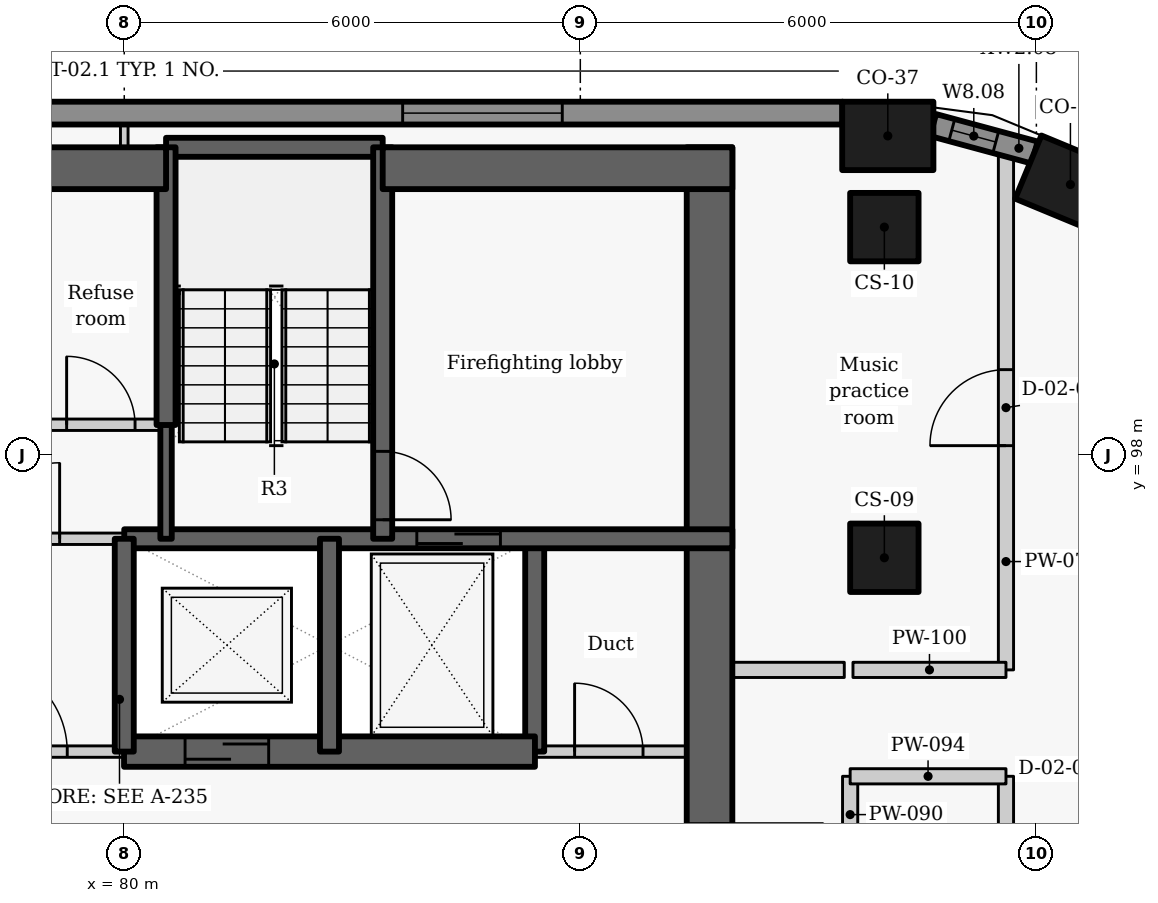
"""IFC4 building model, lengths in metres.
Left out: names, types, materials, properties, quantities, classifications, styles, units other than length and angle.
Written with IfcOpenShell. Run it as: python <this file> out.ifc"""

import sys

from ifc_helpers import new_model, si_unit, direction, frame, frame_2d, origin, origin_2d, place, context, subcontext, project, spatial, rectangle, extrude, element, fill, save


model = new_model("IFC4")
c1 = context("Model", 3, precision=1e-05, world=origin(), true_north=direction((0.0, 1.0)))
c2 = subcontext(c1, "Body", "Model", "MODEL_VIEW")
j1 = project(units=[si_unit("LENGTHUNIT", "METRE"), si_unit("PLANEANGLEUNIT", "RADIAN")], contexts=[c1])
p1 = place(None, origin())
s1 = spatial("IfcSite", under=j1, at=p1, CompositionType="ELEMENT")
p2 = place(p1, origin())
s2 = spatial("IfcBuilding", under=s1, at=p2, CompositionType="ELEMENT")
p3 = place(p2, frame((0.0, 0.0, 203.1)))
s3 = spatial("IfcBuildingStorey", under=s2, at=p3, CompositionType="ELEMENT", Elevation=203.1)
for number, where, z_axis, x_axis in (
    (1, (92.448, 101.56, 0.0), (0.0, 0.0, 1.0), (-0.924, 0.383, 0.0)),
    (2, (90.045, 102.2, 0.0), (0.0, 0.0, 1.0), (-1.0, 0.0, 0.0)),
):
    element("IfcColumn", number, at=place(p3, frame(where, z_axis=z_axis, x_axis=x_axis)), inside=s3, PredefinedType="COLUMN", context=c2, shape_type="SweptSolid", body=[
        extrude(rectangle(XDim=1.2, YDim=0.9, at=origin_2d()), origin(), (0.0, 0.0, 1.0), 3.3),
    ])
for number, where, z_axis, x_axis in (
    (3, (90.0, 96.65, 0.0), (0.0, 0.0, 1.0), (0.0, 1.0, 0.0)),
    (4, (90.0, 101.0, 0.0), (0.0, 0.0, 1.0), (0.0, 1.0, 0.0)),
):
    element("IfcColumn", number, at=place(p3, frame(where, z_axis=z_axis, x_axis=x_axis)), inside=s3, PredefinedType="COLUMN", context=c2, shape_type="SweptSolid", body=[
        extrude(rectangle(XDim=0.9, YDim=0.9, at=origin_2d()), origin(), (0.0, 0.0, 1.0), 3.3),
    ])
p4 = place(p3, frame((91.977, 101.981, 0.0), z_axis=(0.0, 0.0, 1.0), x_axis=(-0.965315341278, 0.261086751661, 0.0)))
e5 = element("IfcWall", 5, at=p4, inside=s3, PredefinedType="SOLIDWALL", context=c2, shape_type="SweptSolid", body=[
    extrude(rectangle(XDim=1.384, YDim=0.3, at=frame_2d((0.692, 0.0))), origin(), (0.0, 0.0, 1.0), 2.425),
])
p5 = place(p4, frame((0.529, 0.0, 0.9)))
e6 = element("IfcOpeningElement", 6, at=p5, cuts=e5, PredefinedType="OPENING", context=c2, shape_type="SweptSolid", body=[
    extrude(rectangle(XDim=0.6, YDim=1.1, at=frame_2d((0.3, 0.55))), frame((0.0, 0.16, 0.0), z_axis=(0.0, -1.0, 0.0), x_axis=(1.0, 0.0, 0.0)), (0.0, 0.0, 1.0), 0.32),
])
p6 = place(p3, frame((89.449, 102.5, 0.0), z_axis=(0.0, 0.0, 1.0), x_axis=(-1.0, 0.0, 0.0)))
e7 = element("IfcWall", 7, at=p6, inside=s3, PredefinedType="SOLIDWALL", context=c2, shape_type="SweptSolid", body=[
    extrude(rectangle(XDim=18.933, YDim=0.3, at=frame_2d((9.466, 0.0))), origin(), (0.0, 0.0, 1.0), 2.425),
])
p7 = place(p6, frame((3.687, 0.0, 0.9)))
e8 = element("IfcOpeningElement", 8, at=p7, cuts=e7, PredefinedType="OPENING", context=c2, shape_type="SweptSolid", body=[
    extrude(rectangle(XDim=2.1, YDim=1.1, at=frame_2d((1.05, 0.55))), frame((0.0, 0.16, 0.0), z_axis=(0.0, -1.0, 0.0), x_axis=(1.0, 0.0, 0.0)), (0.0, 0.0, 1.0), 0.32),
])
p8 = place(p6, frame((13.118, 0.0, 0.9)))
e9 = element("IfcOpeningElement", 9, at=p8, cuts=e7, PredefinedType="OPENING", context=c2, shape_type="SweptSolid", body=[
    extrude(rectangle(XDim=2.1, YDim=1.1, at=frame_2d((1.05, 0.55))), frame((0.0, 0.16, 0.0), z_axis=(0.0, -1.0, 0.0), x_axis=(1.0, 0.0, 0.0)), (0.0, 0.0, 1.0), 0.32),
])
p9 = place(p3, frame((85.4, 94.1, -0.275), z_axis=(0.0, 0.0, 1.0), x_axis=(0.0, 1.0, 0.0)))
e10 = element("IfcWall", 10, at=p9, inside=s3, PredefinedType="SHEAR", context=c2, shape_type="SweptSolid", body=[
    extrude(rectangle(XDim=2.8, YDim=0.25, at=frame_2d((1.4, 0.0))), origin(), (0.0, 0.0, 1.0), 3.3),
])
p10 = place(p3, frame((87.7, 102.05, -0.275), z_axis=(0.0, 0.0, 1.0), x_axis=(0.0, -1.0, 0.0)))
e11 = element("IfcWall", 11, at=p10, inside=s3, PredefinedType="SHEAR", context=c2, shape_type="SweptSolid", body=[
    extrude(rectangle(XDim=14.25, YDim=0.6, at=frame_2d((7.125, 0.0))), origin(), (0.0, 0.0, 1.0), 3.3),
])
p11 = place(p10, frame((8.898, 0.0, 0.275)))
e12 = element("IfcOpeningElement", 12, at=p11, cuts=e11, PredefinedType="OPENING", context=c2, shape_type="SweptSolid", body=[
    extrude(rectangle(XDim=1.5, YDim=2.1, at=frame_2d((0.75, 1.05))), frame((0.0, 0.31, 0.0), z_axis=(0.0, -1.0, 0.0), x_axis=(1.0, 0.0, 0.0)), (0.0, 0.0, 1.0), 0.62),
])
p12 = place(p3, frame((77.297, 94.1, 0.0), z_axis=(0.0, 0.0, 1.0), x_axis=(1.0, 0.0, 0.0)))
e13 = element("IfcWall", 13, at=p12, inside=s3, PredefinedType="PARTITIONING", context=c2, shape_type="SweptSolid", body=[
    extrude(rectangle(XDim=2.706, YDim=0.15, at=frame_2d((1.353, 0.0))), origin(), (0.0, 0.0, 1.0), 3.025),
])
p13 = place(p12, frame((0.753, 0.0, 0.0)))
e14 = element("IfcOpeningElement", 14, at=p13, cuts=e13, PredefinedType="OPENING", context=c2, shape_type="SweptSolid", body=[
    extrude(rectangle(XDim=1.2, YDim=2.1, at=frame_2d((0.6, 1.05))), frame((0.0, 0.085, 0.0), z_axis=(0.0, -1.0, 0.0), x_axis=(1.0, 0.0, 0.0)), (0.0, 0.0, 1.0), 0.17),
])
p14 = place(p3, frame((85.397, 94.1, 0.0), z_axis=(0.0, 0.0, 1.0), x_axis=(1.0, 0.0, 0.0)))
e15 = element("IfcWall", 15, at=p14, inside=s3, PredefinedType="PARTITIONING", context=c2, shape_type="SweptSolid", body=[
    extrude(rectangle(XDim=2.603, YDim=0.15, at=frame_2d((1.302, 0.0))), origin(), (0.0, 0.0, 1.0), 3.025),
])
p15 = place(p14, frame((0.528, 0.0, 0.0)))
e16 = element("IfcOpeningElement", 16, at=p15, cuts=e15, PredefinedType="OPENING", context=c2, shape_type="SweptSolid", body=[
    extrude(rectangle(XDim=0.9, YDim=2.1, at=frame_2d((0.45, 1.05))), frame((0.0, 0.085, 0.0), z_axis=(0.0, -1.0, 0.0), x_axis=(1.0, 0.0, 0.0)), (0.0, 0.0, 1.0), 0.17),
])
p16 = place(p3, frame((79.997, 94.1, -0.275), z_axis=(0.0, 0.0, 1.0), x_axis=(1.0, 0.0, 0.0)))
e17 = element("IfcWall", 17, at=p16, inside=s3, PredefinedType="SHEAR", context=c2, shape_type="SweptSolid", body=[
    extrude(rectangle(XDim=5.406, YDim=0.4, at=frame_2d((2.703, 0.0))), origin(), (0.0, 0.0, 1.0), 3.3),
])
p17 = place(p16, frame((0.803, 0.0, 0.275)))
e18 = element("IfcOpeningElement", 18, at=p17, cuts=e17, PredefinedType="OPENING", context=c2, shape_type="SweptSolid", body=[
    extrude(rectangle(XDim=1.1, YDim=2.1, at=frame_2d((0.55, 1.05))), frame((0.0, 0.21, 0.0), z_axis=(0.0, -1.0, 0.0), x_axis=(1.0, 0.0, 0.0)), (0.0, 0.0, 1.0), 0.42),
])
p18 = place(p3, frame((80.0, 96.9, -0.275), z_axis=(0.0, 0.0, 1.0), x_axis=(1.0, 0.0, 0.0)))
e19 = element("IfcWall", 19, at=p18, inside=s3, PredefinedType="SHEAR", context=c2, shape_type="SweptSolid", body=[
    extrude(rectangle(XDim=8.0, YDim=0.25, at=frame_2d((4.0, 0.0))), origin(), (0.0, 0.0, 1.0), 3.3),
])
p19 = place(p18, frame((3.849, 0.0, 0.275)))
e20 = element("IfcOpeningElement", 20, at=p19, cuts=e19, PredefinedType="OPENING", context=c2, shape_type="SweptSolid", body=[
    extrude(rectangle(XDim=1.1, YDim=2.1, at=frame_2d((0.55, 1.05))), frame((0.0, 0.135, 0.0), z_axis=(0.0, -1.0, 0.0), x_axis=(1.0, 0.0, 0.0)), (0.0, 0.0, 1.0), 0.27),
])
p20 = place(p3, frame((80.0, 94.1, -0.275), z_axis=(0.0, 0.0, 1.0), x_axis=(0.0, 1.0, 0.0)))
e21 = element("IfcWall", 21, at=p20, inside=s3, PredefinedType="SHEAR", context=c2, shape_type="SweptSolid", body=[
    extrude(rectangle(XDim=2.8, YDim=0.25, at=frame_2d((1.4, 0.0))), origin(), (0.0, 0.0, 1.0), 3.3),
])
p21 = place(p3, frame((77.3, 96.9, 0.0), z_axis=(0.0, 0.0, 1.0), x_axis=(1.0, 0.0, 0.0)))
e22 = element("IfcWall", 22, at=p21, inside=s3, PredefinedType="PARTITIONING", context=c2, shape_type="SweptSolid", body=[
    extrude(rectangle(XDim=2.7, YDim=0.15, at=frame_2d((1.35, 0.0))), origin(), (0.0, 0.0, 1.0), 3.025),
])
p22 = place(p21, frame((0.85, 0.0, 0.0)))
e23 = element("IfcOpeningElement", 23, at=p22, cuts=e22, PredefinedType="OPENING", context=c2, shape_type="SweptSolid", body=[
    extrude(rectangle(XDim=1.0, YDim=2.1, at=frame_2d((0.5, 1.05))), frame((0.0, 0.085, 0.0), z_axis=(0.0, -1.0, 0.0), x_axis=(1.0, 0.0, 0.0)), (0.0, 0.0, 1.0), 0.17),
])
p23 = place(p3, frame((82.7, 94.1, -0.275), z_axis=(0.0, 0.0, 1.0), x_axis=(0.0, 1.0, 0.0)))
e24 = element("IfcWall", 24, at=p23, inside=s3, PredefinedType="SHEAR", context=c2, shape_type="SweptSolid", body=[
    extrude(rectangle(XDim=2.8, YDim=0.25, at=frame_2d((1.4, 0.0))), origin(), (0.0, 0.0, 1.0), 3.3),
])
p24 = place(p3, frame((80.55, 102.05, -0.275), z_axis=(0.0, 0.0, 1.0), x_axis=(1.0, 0.0, 0.0)))
e25 = element("IfcWall", 25, at=p24, inside=s3, PredefinedType="SHEAR", context=c2, shape_type="SweptSolid", body=[
    extrude(rectangle(XDim=2.85, YDim=0.25, at=frame_2d((1.425, 0.0))), origin(), (0.0, 0.0, 1.0), 3.3),
])
p25 = place(p3, frame((83.4, 102.05, -0.275), z_axis=(0.0, 0.0, 1.0), x_axis=(0.0, -1.0, 0.0)))
e26 = element("IfcWall", 26, at=p25, inside=s3, PredefinedType="SHEAR", context=c2, shape_type="SweptSolid", body=[
    extrude(rectangle(XDim=5.15, YDim=0.25, at=frame_2d((2.575, 0.0))), origin(), (0.0, 0.0, 1.0), 3.3),
])
p26 = place(p25, frame((4.0, 0.0, 0.275)))
e27 = element("IfcOpeningElement", 27, at=p26, cuts=e26, PredefinedType="OPENING", context=c2, shape_type="SweptSolid", body=[
    extrude(rectangle(XDim=0.9, YDim=2.1, at=frame_2d((0.45, 1.05))), frame((0.0, 0.135, 0.0), z_axis=(0.0, -1.0, 0.0), x_axis=(1.0, 0.0, 0.0)), (0.0, 0.0, 1.0), 0.27),
])
p27 = place(p3, frame((80.55, 96.9, -0.275), z_axis=(0.0, 0.0, 1.0), x_axis=(0.0, 1.0, 0.0)))
e28 = element("IfcWall", 28, at=p27, inside=s3, PredefinedType="SHEAR", context=c2, shape_type="SweptSolid", body=[
    extrude(rectangle(XDim=1.503, YDim=0.15, at=frame_2d((0.751, 0.0))), origin(), (0.0, 0.0, 1.0), 3.3),
])
p28 = place(p3, frame((80.55, 98.397, -0.275), z_axis=(0.0, 0.0, 1.0), x_axis=(0.0, 1.0, 0.0)))
e29 = element("IfcWall", 29, at=p28, inside=s3, PredefinedType="SHEAR", context=c2, shape_type="SweptSolid", body=[
    extrude(rectangle(XDim=3.653, YDim=0.25, at=frame_2d((1.827, 0.0))), origin(), (0.0, 0.0, 1.0), 3.3),
])
p29 = place(p3, frame((75.35, 101.775, -0.275), z_axis=(0.0, 0.0, 1.0), x_axis=(1.0, 0.0, 0.0)))
e30 = element("IfcWall", 30, at=p29, inside=s3, PredefinedType="SHEAR", context=c2, shape_type="SweptSolid", body=[
    extrude(rectangle(XDim=5.2, YDim=0.55, at=frame_2d((2.6, 0.0))), origin(), (0.0, 0.0, 1.0), 3.3),
])
p30 = place(p3, frame((83.4, 101.775, -0.275), z_axis=(0.0, 0.0, 1.0), x_axis=(1.0, 0.0, 0.0)))
e31 = element("IfcWall", 31, at=p30, inside=s3, PredefinedType="SHEAR", context=c2, shape_type="SweptSolid", body=[
    extrude(rectangle(XDim=4.6, YDim=0.55, at=frame_2d((2.3, 0.0))), origin(), (0.0, 0.0, 1.0), 3.3),
])
p31 = place(p3, frame((75.35, 98.4, 0.0), z_axis=(0.0, 0.0, 1.0), x_axis=(1.0, 0.0, 0.0)))
e32 = element("IfcWall", 32, at=p31, inside=s3, PredefinedType="PARTITIONING", context=c2, shape_type="SweptSolid", body=[
    extrude(rectangle(XDim=5.2, YDim=0.15, at=frame_2d((2.6, 0.0))), origin(), (0.0, 0.0, 1.0), 3.025),
])
p32 = place(p31, frame((0.434, 0.0, 0.0)))
e33 = element("IfcOpeningElement", 33, at=p32, cuts=e32, PredefinedType="OPENING", context=c2, shape_type="SweptSolid", body=[
    extrude(rectangle(XDim=0.9, YDim=2.1, at=frame_2d((0.45, 1.05))), frame((0.0, 0.085, 0.0), z_axis=(0.0, -1.0, 0.0), x_axis=(1.0, 0.0, 0.0)), (0.0, 0.0, 1.0), 0.17),
])
p33 = place(p31, frame((2.176, 0.0, 0.0)))
e34 = element("IfcOpeningElement", 34, at=p33, cuts=e32, PredefinedType="OPENING", context=c2, shape_type="SweptSolid", body=[
    extrude(rectangle(XDim=0.9, YDim=2.1, at=frame_2d((0.45, 1.05))), frame((0.0, 0.085, 0.0), z_axis=(0.0, -1.0, 0.0), x_axis=(1.0, 0.0, 0.0)), (0.0, 0.0, 1.0), 0.17),
])
p34 = place(p31, frame((3.892, 0.0, 0.0)))
e35 = element("IfcOpeningElement", 35, at=p34, cuts=e32, PredefinedType="OPENING", context=c2, shape_type="SweptSolid", body=[
    extrude(rectangle(XDim=0.9, YDim=2.1, at=frame_2d((0.45, 1.05))), frame((0.0, 0.085, 0.0), z_axis=(0.0, -1.0, 0.0), x_axis=(1.0, 0.0, 0.0)), (0.0, 0.0, 1.0), 0.17),
])
p35 = place(p3, frame((91.6, 87.537, 0.0), z_axis=(0.0, 0.0, 1.0), x_axis=(0.0, 1.0, 0.0)))
e36 = element("IfcWall", 36, at=p35, inside=s3, PredefinedType="PARTITIONING", context=c2, shape_type="SweptSolid", body=[
    extrude(rectangle(XDim=6.238, YDim=0.2, at=frame_2d((3.119, 0.0))), origin(), (0.0, 0.0, 1.0), 3.025),
])
p36 = place(p35, frame((2.62, 0.0, 0.0)))
e37 = element("IfcOpeningElement", 37, at=p36, cuts=e36, PredefinedType="OPENING", context=c2, shape_type="SweptSolid", body=[
    extrude(rectangle(XDim=1.0, YDim=2.1, at=frame_2d((0.5, 1.05))), frame((0.0, 0.11, 0.0), z_axis=(0.0, -1.0, 0.0), x_axis=(1.0, 0.0, 0.0)), (0.0, 0.0, 1.0), 0.22),
])
p37 = place(p3, frame((91.6, 95.175, 0.0), z_axis=(0.0, 0.0, 1.0), x_axis=(0.0, 1.0, 0.0)))
e38 = element("IfcWall", 38, at=p37, inside=s3, PredefinedType="PARTITIONING", context=c2, shape_type="SweptSolid", body=[
    extrude(rectangle(XDim=6.899, YDim=0.2, at=frame_2d((3.449, 0.0))), origin(), (0.0, 0.0, 1.0), 2.405),
])
p38 = place(p37, frame((2.95, 0.0, 0.0)))
e39 = element("IfcOpeningElement", 39, at=p38, cuts=e38, PredefinedType="OPENING", context=c2, shape_type="SweptSolid", body=[
    extrude(rectangle(XDim=1.0, YDim=2.1, at=frame_2d((0.5, 1.05))), frame((0.0, 0.11, 0.0), z_axis=(0.0, -1.0, 0.0), x_axis=(1.0, 0.0, 0.0)), (0.0, 0.0, 1.0), 0.22),
])
p39 = place(p3, frame((89.55, 92.767, 0.0), z_axis=(0.0, 0.0, 1.0), x_axis=(0.0, 1.0, 0.0)))
e40 = element("IfcWall", 40, at=p39, inside=s3, PredefinedType="PARTITIONING", context=c2, shape_type="SweptSolid", body=[
    extrude(rectangle(XDim=1.008, YDim=0.2, at=frame_2d((0.504, 0.0))), origin(), (0.0, 0.0, 1.0), 3.025),
])
p40 = place(p3, frame((89.55, 93.775, 0.0), z_axis=(0.0, 0.0, 1.0), x_axis=(1.0, 0.0, 0.0)))
e41 = element("IfcWall", 41, at=p40, inside=s3, PredefinedType="PARTITIONING", context=c2, shape_type="SweptSolid", body=[
    extrude(rectangle(XDim=2.05, YDim=0.2, at=frame_2d((1.025, 0.0))), origin(), (0.0, 0.0, 1.0), 2.505),
])
p41 = place(p3, frame((88.0, 95.175, 0.0), z_axis=(0.0, 0.0, 1.0), x_axis=(1.0, 0.0, 0.0)))
e42 = element("IfcWall", 42, at=p41, inside=s3, PredefinedType="PARTITIONING", context=c2, shape_type="SweptSolid", body=[
    extrude(rectangle(XDim=1.473, YDim=0.2, at=frame_2d((0.736, 0.0))), origin(), (0.0, 0.0, 1.0), 3.025),
])
p42 = place(p3, frame((89.587, 95.175, 0.0), z_axis=(0.0, 0.0, 1.0), x_axis=(1.0, 0.0, 0.0)))
e43 = element("IfcWall", 43, at=p42, inside=s3, PredefinedType="PARTITIONING", context=c2, shape_type="SweptSolid", body=[
    extrude(rectangle(XDim=2.013, YDim=0.2, at=frame_2d((1.006, 0.0))), origin(), (0.0, 0.0, 1.0), 2.505),
])
p43 = place(p3, frame((80.0, 102.05, 0.0), z_axis=(0.0, 0.0, 1.0), x_axis=(0.0, 1.0, 0.0)))
e44 = element("IfcWall", 44, at=p43, inside=s3, PredefinedType="PARTITIONING", context=c2, shape_type="SweptSolid", body=[
    extrude(rectangle(XDim=0.3, YDim=0.1, at=frame_2d((0.15, 0.0))), origin(), (0.0, 0.0, 1.0), 3.025),
])
p44 = place(p5, origin())
e45 = element("IfcWindow", 45, at=p44, inside=s3, PartitioningType="SINGLE_PANEL", PredefinedType="WINDOW", context=c2, shape_type="SweptSolid", body=[
    extrude(rectangle(XDim=0.6, YDim=1.1, at=frame_2d((0.3, 0.55))), frame((0.0, 0.03, 0.0), z_axis=(0.0, -1.0, 0.0), x_axis=(1.0, 0.0, 0.0)), (0.0, 0.0, 1.0), 0.06),
])
fill(e6, e45)
p45 = place(p7, origin())
e46 = element("IfcWindow", 46, at=p45, inside=s3, PartitioningType="SINGLE_PANEL", PredefinedType="WINDOW", context=c2, shape_type="SweptSolid", body=[
    extrude(rectangle(XDim=2.1, YDim=1.1, at=frame_2d((1.05, 0.55))), frame((0.0, 0.03, 0.0), z_axis=(0.0, -1.0, 0.0), x_axis=(1.0, 0.0, 0.0)), (0.0, 0.0, 1.0), 0.06),
])
fill(e8, e46)
p46 = place(p13, origin())
e47 = element("IfcDoor", 47, at=p46, inside=s3, OperationType="DOUBLE_DOOR_SINGLE_SWING", PredefinedType="DOOR", context=c2, shape_type="SweptSolid", body=[
    extrude(rectangle(XDim=1.2, YDim=2.1, at=frame_2d((0.6, 1.05))), frame((0.0, 0.025, 0.0), z_axis=(0.0, -1.0, 0.0), x_axis=(1.0, 0.0, 0.0)), (0.0, 0.0, 1.0), 0.05),
])
fill(e14, e47)
p47 = place(p17, origin())
e48 = element("IfcDoor", 48, at=p47, inside=s3, OperationType="SLIDING_TO_LEFT", PredefinedType="DOOR", context=c2, shape_type="SweptSolid", body=[
    extrude(rectangle(XDim=1.1, YDim=2.1, at=frame_2d((0.55, 1.05))), frame((0.0, 0.025, 0.0), z_axis=(0.0, -1.0, 0.0), x_axis=(1.0, 0.0, 0.0)), (0.0, 0.0, 1.0), 0.05),
])
fill(e18, e48)
p48 = place(p19, origin())
e49 = element("IfcDoor", 49, at=p48, inside=s3, OperationType="SLIDING_TO_LEFT", PredefinedType="DOOR", context=c2, shape_type="SweptSolid", body=[
    extrude(rectangle(XDim=1.1, YDim=2.1, at=frame_2d((0.55, 1.05))), frame((0.0, 0.025, 0.0), z_axis=(0.0, -1.0, 0.0), x_axis=(1.0, 0.0, 0.0)), (0.0, 0.0, 1.0), 0.05),
])
fill(e20, e49)
p49 = place(p15, origin())
e50 = element("IfcDoor", 50, at=p49, inside=s3, OperationType="SINGLE_SWING_LEFT", PredefinedType="DOOR", context=c2, shape_type="SweptSolid", body=[
    extrude(rectangle(XDim=0.9, YDim=2.1, at=frame_2d((0.45, 1.05))), frame((0.0, 0.025, 0.0), z_axis=(0.0, -1.0, 0.0), x_axis=(1.0, 0.0, 0.0)), (0.0, 0.0, 1.0), 0.05),
])
fill(e16, e50)
p50 = place(p22, origin())
e51 = element("IfcDoor", 51, at=p50, inside=s3, OperationType="SINGLE_SWING_RIGHT", PredefinedType="DOOR", context=c2, shape_type="SweptSolid", body=[
    extrude(rectangle(XDim=1.0, YDim=2.1, at=frame_2d((0.5, 1.05))), frame((0.0, 0.025, 0.0), z_axis=(0.0, -1.0, 0.0), x_axis=(1.0, 0.0, 0.0)), (0.0, 0.0, 1.0), 0.05),
])
fill(e23, e51)
p51 = place(p34, origin())
e52 = element("IfcDoor", 52, at=p51, inside=s3, OperationType="SINGLE_SWING_LEFT", PredefinedType="DOOR", context=c2, shape_type="SweptSolid", body=[
    extrude(rectangle(XDim=0.9, YDim=2.1, at=frame_2d((0.45, 1.05))), frame((0.0, 0.025, 0.0), z_axis=(0.0, -1.0, 0.0), x_axis=(1.0, 0.0, 0.0)), (0.0, 0.0, 1.0), 0.05),
])
fill(e35, e52)
p52 = place(p26, origin())
e53 = element("IfcDoor", 53, at=p52, inside=s3, OperationType="SINGLE_SWING_RIGHT", PredefinedType="DOOR", context=c2, shape_type="SweptSolid", body=[
    extrude(rectangle(XDim=0.9, YDim=2.1, at=frame_2d((0.45, 1.05))), frame((0.0, 0.025, 0.0), z_axis=(0.0, -1.0, 0.0), x_axis=(1.0, 0.0, 0.0)), (0.0, 0.0, 1.0), 0.05),
])
fill(e27, e53)
p53 = place(p38, origin())
e54 = element("IfcDoor", 54, at=p53, inside=s3, OperationType="SINGLE_SWING_LEFT", PredefinedType="DOOR", context=c2, shape_type="SweptSolid", body=[
    extrude(rectangle(XDim=1.0, YDim=2.1, at=frame_2d((0.5, 1.05))), frame((0.0, 0.025, 0.0), z_axis=(0.0, -1.0, 0.0), x_axis=(1.0, 0.0, 0.0)), (0.0, 0.0, 1.0), 0.05),
])
fill(e39, e54)
p54 = place(p11, origin())
e55 = element("IfcDoor", 55, at=p54, inside=s3, OperationType="DOUBLE_DOOR_SINGLE_SWING", PredefinedType="DOOR", context=c2, shape_type="SweptSolid", body=[
    extrude(rectangle(XDim=1.5, YDim=2.1, at=frame_2d((0.75, 1.05))), frame((0.0, 0.025, 0.0), z_axis=(0.0, -1.0, 0.0), x_axis=(1.0, 0.0, 0.0)), (0.0, 0.0, 1.0), 0.05),
])
fill(e12, e55)
save(model, sys.argv[1])
